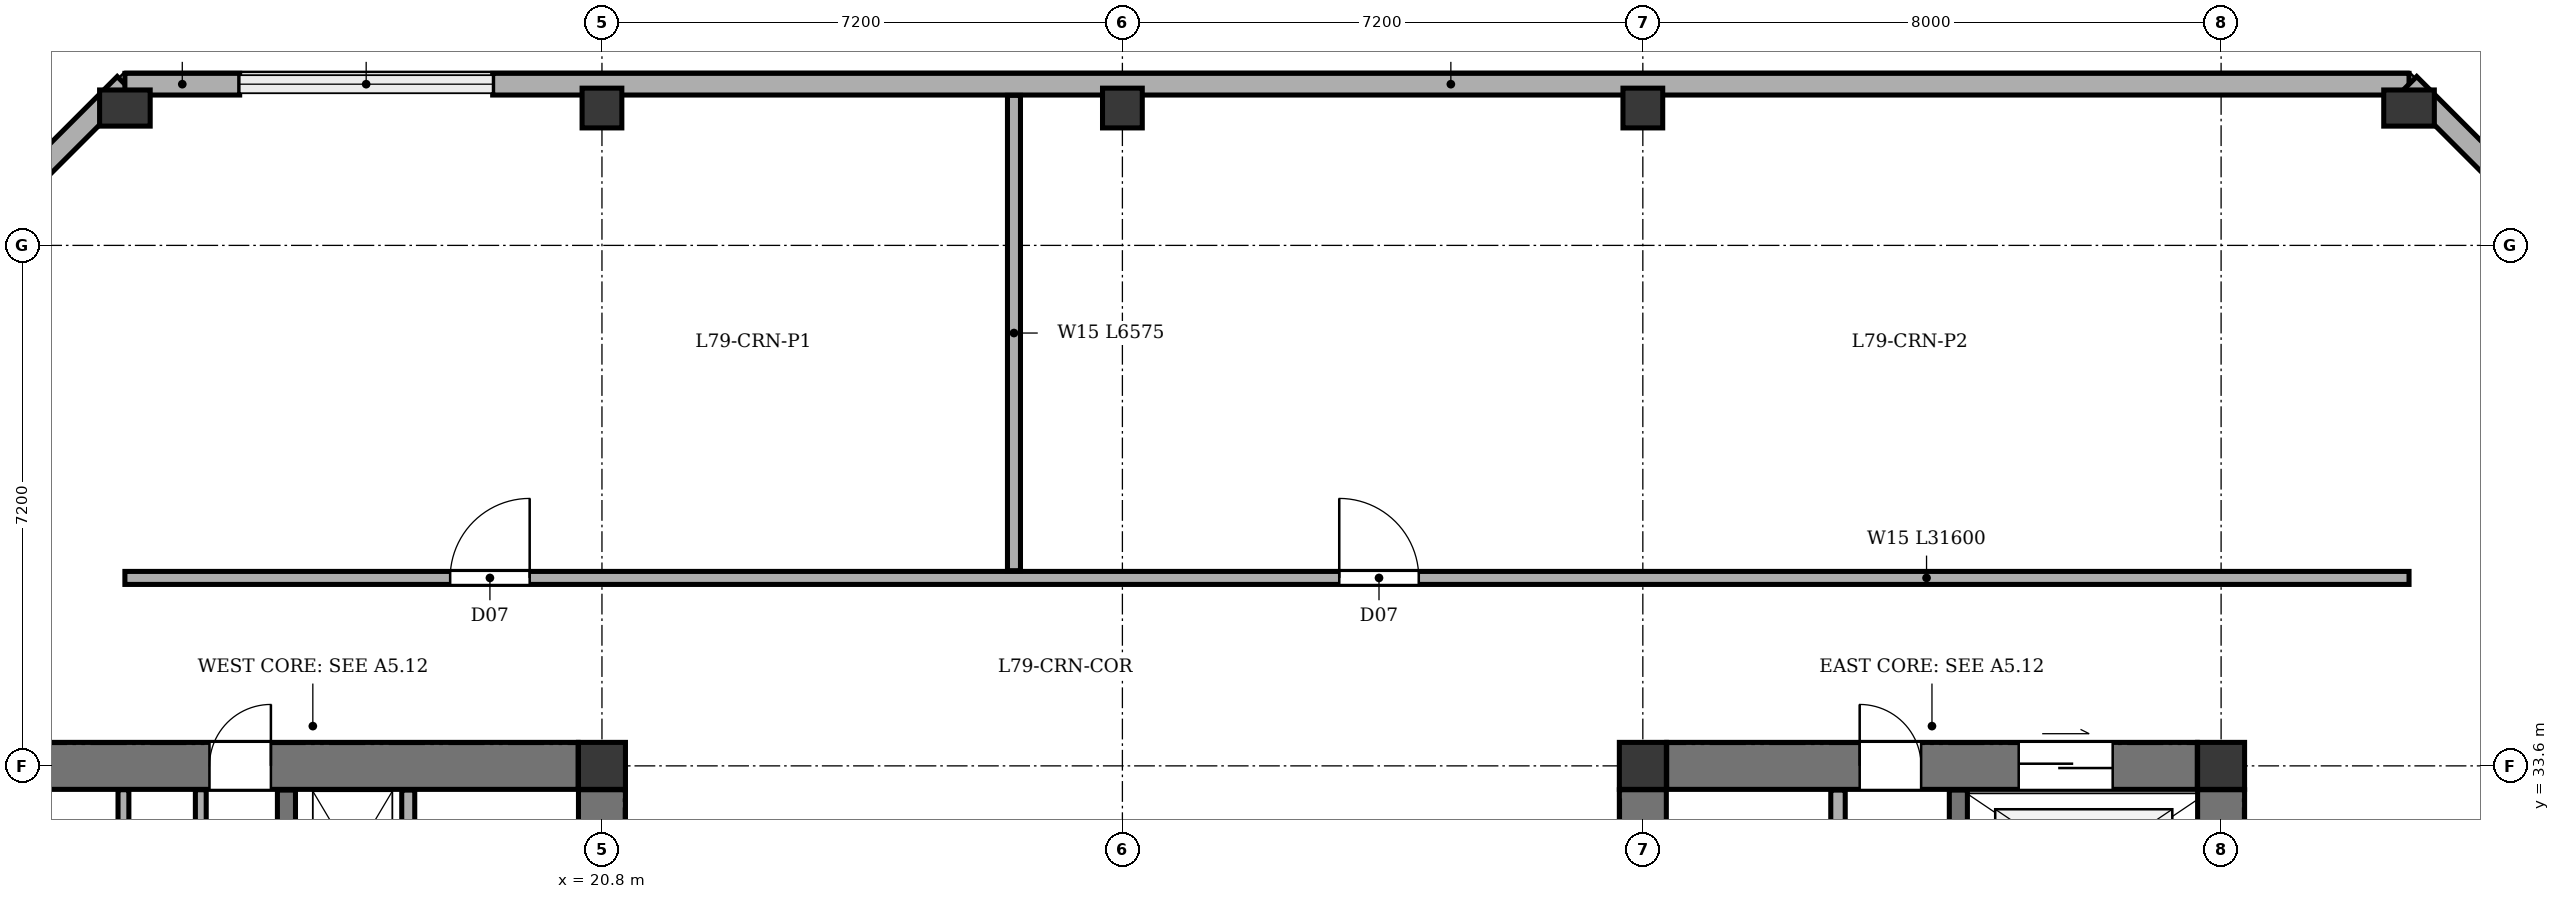
"""IFC4 building model, lengths in metres.
Left out: names, types, materials, properties, quantities, classifications, styles, units other than length and angle.
Written with IfcOpenShell. Run it as: python <this file> out.ifc"""

import sys

from ifc_helpers import new_model, si_unit, direction, frame, frame_2d, origin, origin_2d, place, context, subcontext, project, spatial, rectangle, extrude, element, fill, save


model = new_model("IFC4")
c1 = context("Model", 3, precision=1e-05, world=origin(), true_north=direction((0.0, 1.0)))
c2 = subcontext(c1, "Body", "Model", "MODEL_VIEW")
j1 = project(units=[si_unit("LENGTHUNIT", "METRE"), si_unit("PLANEANGLEUNIT", "RADIAN")], contexts=[c1])
p1 = place(None, origin())
s1 = spatial("IfcSite", under=j1, at=p1, CompositionType="ELEMENT")
p2 = place(p1, origin())
s2 = spatial("IfcBuilding", under=s1, at=p2, CompositionType="ELEMENT")
p3 = place(p2, frame((0.0, 0.0, 300.6)))
s3 = spatial("IfcBuildingStorey", under=s2, at=p3, CompositionType="ELEMENT", Elevation=300.6)
for number, where, z_axis, x_axis in (
    (1, (20.8, 33.6, 0.0), (0.0, 0.0, 1.0), (1.0, 0.0, 0.0)),
    (2, (35.2, 33.6, 0.0), (0.0, 0.0, 1.0), (1.0, 0.0, 0.0)),
    (3, (43.2, 33.6, 0.0), (0.0, 0.0, 1.0), (1.0, 0.0, 0.0)),
):
    element("IfcColumn", number, at=place(p3, frame(where, z_axis=z_axis, x_axis=x_axis)), inside=s3, PredefinedType="COLUMN", context=c2, shape_type="SweptSolid", body=[
        extrude(rectangle(XDim=0.65, YDim=0.65, at=origin_2d()), origin(), (0.0, 0.0, 1.0), 4.2),
    ])
p4 = place(p3, frame((14.2, 42.7, 0.0), z_axis=(0.0, 0.0, 1.0), x_axis=(1.0, 0.0, 0.0)))
e4 = element("IfcColumn", 4, at=p4, inside=s3, PredefinedType="COLUMN", context=c2, shape_type="SweptSolid", body=[
    extrude(rectangle(XDim=0.5, YDim=0.7, at=origin_2d()), origin(), (0.0, 0.0, 1.0), 4.2),
])
for number, where, z_axis, x_axis in (
    (5, (20.8, 42.7, 0.0), (0.0, 0.0, 1.0), (1.0, 0.0, 0.0)),
    (6, (28.0, 42.7, 0.0), (0.0, 0.0, 1.0), (1.0, 0.0, 0.0)),
    (7, (35.2, 42.7, 0.0), (0.0, 0.0, 1.0), (1.0, 0.0, 0.0)),
):
    element("IfcColumn", number, at=place(p3, frame(where, z_axis=z_axis, x_axis=x_axis)), inside=s3, PredefinedType="COLUMN", context=c2, shape_type="SweptSolid", body=[
        extrude(rectangle(XDim=0.55, YDim=0.55, at=origin_2d()), origin(), (0.0, 0.0, 1.0), 4.2),
    ])
p5 = place(p3, frame((45.8, 42.7, 0.0), z_axis=(0.0, 0.0, 1.0), x_axis=(1.0, 0.0, 0.0)))
e8 = element("IfcColumn", 8, at=p5, inside=s3, PredefinedType="COLUMN", context=c2, shape_type="SweptSolid", body=[
    extrude(rectangle(XDim=0.5, YDim=0.7, at=origin_2d()), origin(), (0.0, 0.0, 1.0), 4.2),
])
p6 = place(p3, frame((10.87, 39.7, 0.0), z_axis=(0.0, 0.0, 1.0), x_axis=(0.707080859425, 0.707132701998, 0.0)))
e9 = element("IfcWall", 9, at=p6, inside=s3, PredefinedType="STANDARD", context=c2, shape_type="SweptSolid", body=[
    extrude(rectangle(XDim=4.709, YDim=0.3, at=frame_2d((2.354, 0.0))), origin(), (0.0, 0.0, 1.0), 3.545),
])
p7 = place(p3, frame((14.2, 43.03, 0.0), z_axis=(0.0, 0.0, 1.0), x_axis=(1.0, 0.0, 0.0)))
e10 = element("IfcWall", 10, at=p7, inside=s3, PredefinedType="STANDARD", context=c2, shape_type="SweptSolid", body=[
    extrude(rectangle(XDim=1.588, YDim=0.3, at=frame_2d((0.794, 0.0))), origin(), (0.0, 0.0, 1.0), 3.545),
])
p8 = place(p3, frame((19.288, 43.03, 0.0), z_axis=(0.0, 0.0, 1.0), x_axis=(1.0, 0.0, 0.0)))
e11 = element("IfcWall", 11, at=p8, inside=s3, PredefinedType="STANDARD", context=c2, shape_type="SweptSolid", body=[
    extrude(rectangle(XDim=26.512, YDim=0.3, at=frame_2d((13.256, 0.0))), origin(), (0.0, 0.0, 1.0), 3.545),
])
p9 = place(p3, frame((45.8, 43.03, 0.0), z_axis=(0.0, 0.0, 1.0), x_axis=(0.707080859425, -0.707132701998, 0.0)))
e12 = element("IfcWall", 12, at=p9, inside=s3, PredefinedType="STANDARD", context=c2, shape_type="SweptSolid", body=[
    extrude(rectangle(XDim=4.709, YDim=0.3, at=frame_2d((2.354, 0.0))), origin(), (0.0, 0.0, 1.0), 3.545),
])
p10 = place(p3, frame((13.13, 33.6, 0.0), z_axis=(0.0, 0.0, 1.0), x_axis=(1.0, 0.0, 0.0)))
e13 = element("IfcWall", 13, at=p10, inside=s3, PredefinedType="SHEAR", context=c2, shape_type="SweptSolid", body=[
    extrude(rectangle(XDim=7.34, YDim=0.65, at=frame_2d((3.67, 0.0))), origin(), (0.0, 0.0, 1.0), 3.92),
])
p11 = place(p10, frame((2.24, 0.0, 0.0)))
e14 = element("IfcOpeningElement", 14, at=p11, cuts=e13, PredefinedType="OPENING", context=c2, shape_type="SweptSolid", body=[
    extrude(rectangle(XDim=0.85, YDim=2.02, at=frame_2d((0.425, 1.01))), frame((0.0, 0.335, 0.0), z_axis=(0.0, -1.0, 0.0), x_axis=(1.0, 0.0, 0.0)), (0.0, 0.0, 1.0), 0.67),
])
p12 = place(p3, frame((20.8, 31.1, 0.0), z_axis=(0.0, 0.0, 1.0), x_axis=(0.0, 1.0, 0.0)))
e15 = element("IfcWall", 15, at=p12, inside=s3, PredefinedType="SHEAR", context=c2, shape_type="SweptSolid", body=[
    extrude(rectangle(XDim=2.17, YDim=0.65, at=frame_2d((1.085, 0.0))), origin(), (0.0, 0.0, 1.0), 3.92),
])
p13 = place(p3, frame((16.435, 21.135, 0.0), z_axis=(0.0, 0.0, 1.0), x_axis=(0.0, 1.0, 0.0)))
e16 = element("IfcWall", 16, at=p13, inside=s3, PredefinedType="SHEAR", context=c2, shape_type="SweptSolid", body=[
    extrude(rectangle(XDim=12.13, YDim=0.25, at=frame_2d((6.065, 0.0))), origin(), (0.0, 0.0, 1.0), 3.92),
])
p14 = place(p13, frame((0.515, 0.0, 0.0)))
e17 = element("IfcOpeningElement", 17, at=p14, cuts=e16, PredefinedType="OPENING", context=c2, shape_type="SweptSolid", body=[
    extrude(rectangle(XDim=1.2, YDim=2.15, at=frame_2d((0.6, 1.075))), frame((0.0, 0.135, 0.0), z_axis=(0.0, -1.0, 0.0), x_axis=(1.0, 0.0, 0.0)), (0.0, 0.0, 1.0), 0.27),
])
p15 = place(p13, frame((2.665, 0.0, 0.0)))
e18 = element("IfcOpeningElement", 18, at=p15, cuts=e16, PredefinedType="OPENING", context=c2, shape_type="SweptSolid", body=[
    extrude(rectangle(XDim=1.15, YDim=2.15, at=frame_2d((0.575, 1.075))), frame((0.0, 0.135, 0.0), z_axis=(0.0, -1.0, 0.0), x_axis=(1.0, 0.0, 0.0)), (0.0, 0.0, 1.0), 0.27),
])
p16 = place(p3, frame((18.12, 31.17, 0.0), z_axis=(0.0, 0.0, 1.0), x_axis=(0.0, 1.0, 0.0)))
e19 = element("IfcWall", 19, at=p16, inside=s3, PredefinedType="PARTITIONING", context=c2, shape_type="SweptSolid", body=[
    extrude(rectangle(XDim=2.095, YDim=0.18, at=frame_2d((1.047, 0.0))), origin(), (0.0, 0.0, 1.0), 3.92),
])
p17 = place(p3, frame((43.2, 21.13, 0.0), z_axis=(0.0, 0.0, 1.0), x_axis=(0.0, 1.0, 0.0)))
e20 = element("IfcWall", 20, at=p17, inside=s3, PredefinedType="SHEAR", context=c2, shape_type="SweptSolid", body=[
    extrude(rectangle(XDim=12.14, YDim=0.65, at=frame_2d((6.07, 0.0))), origin(), (0.0, 0.0, 1.0), 3.92),
])
p18 = place(p3, frame((35.53, 33.6, 0.0), z_axis=(0.0, 0.0, 1.0), x_axis=(1.0, 0.0, 0.0)))
e21 = element("IfcWall", 21, at=p18, inside=s3, PredefinedType="SHEAR", context=c2, shape_type="SweptSolid", body=[
    extrude(rectangle(XDim=7.34, YDim=0.65, at=frame_2d((3.67, 0.0))), origin(), (0.0, 0.0, 1.0), 3.92),
])
p19 = place(p18, frame((4.87, 0.0, 0.0)))
e22 = element("IfcOpeningElement", 22, at=p19, cuts=e21, PredefinedType="OPENING", context=c2, shape_type="SweptSolid", body=[
    extrude(rectangle(XDim=1.3, YDim=2.15, at=frame_2d((0.65, 1.075))), frame((0.0, 0.335, 0.0), z_axis=(0.0, -1.0, 0.0), x_axis=(1.0, 0.0, 0.0)), (0.0, 0.0, 1.0), 0.67),
])
p20 = place(p18, frame((2.67, 0.0, 0.0)))
e23 = element("IfcOpeningElement", 23, at=p20, cuts=e21, PredefinedType="OPENING", context=c2, shape_type="SweptSolid", body=[
    extrude(rectangle(XDim=0.85, YDim=2.02, at=frame_2d((0.425, 1.01))), frame((0.0, 0.335, 0.0), z_axis=(0.0, -1.0, 0.0), x_axis=(1.0, 0.0, 0.0)), (0.0, 0.0, 1.0), 0.67),
])
p21 = place(p3, frame((35.2, 31.1, 0.0), z_axis=(0.0, 0.0, 1.0), x_axis=(0.0, 1.0, 0.0)))
e24 = element("IfcWall", 24, at=p21, inside=s3, PredefinedType="SHEAR", context=c2, shape_type="SweptSolid", body=[
    extrude(rectangle(XDim=2.17, YDim=0.65, at=frame_2d((1.085, 0.0))), origin(), (0.0, 0.0, 1.0), 3.92),
])
p22 = place(p3, frame((39.565, 21.135, 0.0), z_axis=(0.0, 0.0, 1.0), x_axis=(0.0, 1.0, 0.0)))
e25 = element("IfcWall", 25, at=p22, inside=s3, PredefinedType="SHEAR", context=c2, shape_type="SweptSolid", body=[
    extrude(rectangle(XDim=12.13, YDim=0.25, at=frame_2d((6.065, 0.0))), origin(), (0.0, 0.0, 1.0), 3.92),
])
p23 = place(p22, frame((0.515, 0.0, 0.0)))
e26 = element("IfcOpeningElement", 26, at=p23, cuts=e25, PredefinedType="OPENING", context=c2, shape_type="SweptSolid", body=[
    extrude(rectangle(XDim=1.2, YDim=2.15, at=frame_2d((0.6, 1.075))), frame((0.0, 0.135, 0.0), z_axis=(0.0, -1.0, 0.0), x_axis=(1.0, 0.0, 0.0)), (0.0, 0.0, 1.0), 0.27),
])
p24 = place(p22, frame((2.665, 0.0, 0.0)))
e27 = element("IfcOpeningElement", 27, at=p24, cuts=e25, PredefinedType="OPENING", context=c2, shape_type="SweptSolid", body=[
    extrude(rectangle(XDim=1.15, YDim=2.15, at=frame_2d((0.575, 1.075))), frame((0.0, 0.135, 0.0), z_axis=(0.0, -1.0, 0.0), x_axis=(1.0, 0.0, 0.0)), (0.0, 0.0, 1.0), 0.27),
])
p25 = place(p3, frame((37.9, 25.27, 0.0), z_axis=(0.0, 0.0, 1.0), x_axis=(0.0, 1.0, 0.0)))
e28 = element("IfcWall", 28, at=p25, inside=s3, PredefinedType="SOLIDWALL", context=c2, shape_type="SweptSolid", body=[
    extrude(rectangle(XDim=7.995, YDim=0.2, at=frame_2d((3.998, 0.0))), origin(), (0.0, 0.0, 1.0), 3.92),
])
p26 = place(p3, frame((14.18, 30.96, 0.0), z_axis=(0.0, 0.0, 1.0), x_axis=(0.0, 1.0, 0.0)))
e29 = element("IfcWall", 29, at=p26, inside=s3, PredefinedType="PARTITIONING", context=c2, shape_type="SweptSolid", body=[
    extrude(rectangle(XDim=2.31, YDim=0.15, at=frame_2d((1.155, 0.0))), origin(), (0.0, 0.0, 1.0), 3.92),
])
p27 = place(p26, frame((0.47, 0.0, 0.0)))
e30 = element("IfcOpeningElement", 30, at=p27, cuts=e29, PredefinedType="OPENING", context=c2, shape_type="SweptSolid", body=[
    extrude(rectangle(XDim=0.85, YDim=2.02, at=frame_2d((0.425, 1.01))), frame((0.0, 0.085, 0.0), z_axis=(0.0, -1.0, 0.0), x_axis=(1.0, 0.0, 0.0)), (0.0, 0.0, 1.0), 0.17),
])
p28 = place(p3, frame((15.25, 30.96, 0.0), z_axis=(0.0, 0.0, 1.0), x_axis=(0.0, 1.0, 0.0)))
e31 = element("IfcWall", 31, at=p28, inside=s3, PredefinedType="PARTITIONING", context=c2, shape_type="SweptSolid", body=[
    extrude(rectangle(XDim=2.31, YDim=0.15, at=frame_2d((1.155, 0.0))), origin(), (0.0, 0.0, 1.0), 3.92),
])
p29 = place(p28, frame((0.47, 0.0, 0.0)))
e32 = element("IfcOpeningElement", 32, at=p29, cuts=e31, PredefinedType="OPENING", context=c2, shape_type="SweptSolid", body=[
    extrude(rectangle(XDim=0.85, YDim=2.02, at=frame_2d((0.425, 1.01))), frame((0.0, 0.085, 0.0), z_axis=(0.0, -1.0, 0.0), x_axis=(1.0, 0.0, 0.0)), (0.0, 0.0, 1.0), 0.17),
])
p30 = place(p3, frame((14.2, 36.2, 0.0), z_axis=(0.0, 0.0, 1.0), x_axis=(1.0, 0.0, 0.0)))
e33 = element("IfcWall", 33, at=p30, inside=s3, PredefinedType="PARTITIONING", context=c2, shape_type="SweptSolid", body=[
    extrude(rectangle(XDim=31.6, YDim=0.18, at=frame_2d((15.8, 0.0))), origin(), (0.0, 0.0, 1.0), 3.92),
])
p31 = place(p30, frame((4.5, 0.0, 0.0)))
e34 = element("IfcOpeningElement", 34, at=p31, cuts=e33, PredefinedType="OPENING", context=c2, shape_type="SweptSolid", body=[
    extrude(rectangle(XDim=1.1, YDim=2.15, at=frame_2d((0.55, 1.075))), frame((0.0, 0.1, 0.0), z_axis=(0.0, -1.0, 0.0), x_axis=(1.0, 0.0, 0.0)), (0.0, 0.0, 1.0), 0.2),
])
p32 = place(p30, frame((16.8, 0.0, 0.0)))
e35 = element("IfcOpeningElement", 35, at=p32, cuts=e33, PredefinedType="OPENING", context=c2, shape_type="SweptSolid", body=[
    extrude(rectangle(XDim=1.1, YDim=2.15, at=frame_2d((0.55, 1.075))), frame((0.0, 0.1, 0.0), z_axis=(0.0, -1.0, 0.0), x_axis=(1.0, 0.0, 0.0)), (0.0, 0.0, 1.0), 0.2),
])
p33 = place(p3, frame((26.5, 36.3, 0.0), z_axis=(0.0, 0.0, 1.0), x_axis=(0.0, 1.0, 0.0)))
e36 = element("IfcWall", 36, at=p33, inside=s3, PredefinedType="PARTITIONING", context=c2, shape_type="SweptSolid", body=[
    extrude(rectangle(XDim=6.575, YDim=0.18, at=frame_2d((3.288, 0.0))), origin(), (0.0, 0.0, 1.0), 3.92),
])
p34 = place(p11, origin())
e37 = element("IfcDoor", 37, at=p34, inside=s3, OperationType="SINGLE_SWING_RIGHT", PredefinedType="DOOR", context=c2, shape_type="SweptSolid", body=[
    extrude(rectangle(XDim=0.85, YDim=2.02, at=frame_2d((0.425, 1.01))), frame((0.0, 0.025, 0.0), z_axis=(0.0, -1.0, 0.0), x_axis=(1.0, 0.0, 0.0)), (0.0, 0.0, 1.0), 0.05),
])
fill(e14, e37)
p35 = place(p19, origin())
e38 = element("IfcDoor", 38, at=p35, inside=s3, OperationType="DOUBLE_DOOR_SLIDING", PredefinedType="DOOR", context=c2, shape_type="SweptSolid", body=[
    extrude(rectangle(XDim=1.3, YDim=2.15, at=frame_2d((0.65, 1.075))), frame((0.0, 0.025, 0.0), z_axis=(0.0, -1.0, 0.0), x_axis=(1.0, 0.0, 0.0)), (0.0, 0.0, 1.0), 0.05),
])
fill(e22, e38)
p36 = place(p20, origin())
e39 = element("IfcDoor", 39, at=p36, inside=s3, OperationType="SINGLE_SWING_LEFT", PredefinedType="DOOR", context=c2, shape_type="SweptSolid", body=[
    extrude(rectangle(XDim=0.85, YDim=2.02, at=frame_2d((0.425, 1.01))), frame((0.0, 0.025, 0.0), z_axis=(0.0, -1.0, 0.0), x_axis=(1.0, 0.0, 0.0)), (0.0, 0.0, 1.0), 0.05),
])
fill(e23, e39)
p37 = place(p31, origin())
e40 = element("IfcDoor", 40, at=p37, inside=s3, OperationType="SINGLE_SWING_RIGHT", PredefinedType="DOOR", context=c2, shape_type="SweptSolid", body=[
    extrude(rectangle(XDim=1.1, YDim=2.15, at=frame_2d((0.55, 1.075))), frame((0.0, 0.025, 0.0), z_axis=(0.0, -1.0, 0.0), x_axis=(1.0, 0.0, 0.0)), (0.0, 0.0, 1.0), 0.05),
])
fill(e34, e40)
p38 = place(p32, origin())
e41 = element("IfcDoor", 41, at=p38, inside=s3, OperationType="SINGLE_SWING_LEFT", PredefinedType="DOOR", context=c2, shape_type="SweptSolid", body=[
    extrude(rectangle(XDim=1.1, YDim=2.15, at=frame_2d((0.55, 1.075))), frame((0.0, 0.025, 0.0), z_axis=(0.0, -1.0, 0.0), x_axis=(1.0, 0.0, 0.0)), (0.0, 0.0, 1.0), 0.05),
])
fill(e35, e41)
save(model, sys.argv[1])
